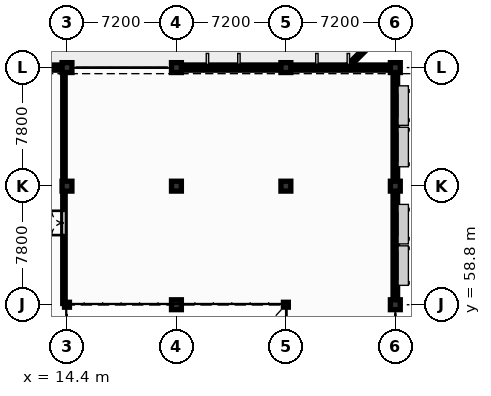
"""IFC4 building model, lengths in metres.
Left out: names, types, materials, properties, quantities, classifications, styles, units other than length and angle.
Written with IfcOpenShell. Run it as: python <this file> out.ifc"""

import sys

from ifc_helpers import new_model, si_unit, direction, frame, frame_2d, origin, origin_2d, place, context, subcontext, project, spatial, rectangle, hollow_circle, extrude, element, fill, save


model = new_model("IFC4")
c1 = context("Model", 3, precision=1e-05, world=origin(), true_north=direction((0.0, 1.0)))
c2 = subcontext(c1, "Body", "Model", "MODEL_VIEW")
j1 = project(units=[si_unit("LENGTHUNIT", "METRE"), si_unit("PLANEANGLEUNIT", "RADIAN")], contexts=[c1])
p1 = place(None, origin())
s1 = spatial("IfcSite", under=j1, at=p1, CompositionType="ELEMENT")
p2 = place(p1, origin())
s2 = spatial("IfcBuilding", under=s1, at=p2, CompositionType="ELEMENT")
p3 = place(p2, frame((0.0, 0.0, 5.1)))
s3 = spatial("IfcBuildingStorey", under=s2, at=p3, CompositionType="ELEMENT", Elevation=5.1)
p4 = place(p3, frame((14.4, 58.8, 0.0), z_axis=(0.0, 0.0, 1.0), x_axis=(1.0, 0.0, 0.0)))
e1 = element("IfcColumn", 1, at=p4, inside=s3, PredefinedType="COLUMN", context=c2, shape_type="SweptSolid", body=[
    extrude(hollow_circle(Radius=0.162, WallThickness=0.012, at=origin_2d()), origin(), (0.0, 0.0, 1.0), 3.84),
])
for number, where, z_axis, x_axis in (
    (2, (14.4, 66.6, 0.0), (0.0, 0.0, 1.0), (1.0, 0.0, 0.0)),
    (3, (14.4, 74.4, 0.0), (0.0, 0.0, 1.0), (1.0, 0.0, 0.0)),
    (4, (21.6, 58.8, 0.0), (0.0, 0.0, 1.0), (1.0, 0.0, 0.0)),
    (5, (21.6, 66.6, 0.0), (0.0, 0.0, 1.0), (1.0, 0.0, 0.0)),
    (6, (21.6, 74.4, 0.0), (0.0, 0.0, 1.0), (1.0, 0.0, 0.0)),
):
    element("IfcColumn", number, at=place(p3, frame(where, z_axis=z_axis, x_axis=x_axis)), inside=s3, PredefinedType="COLUMN", context=c2, shape_type="SweptSolid", body=[
        extrude(rectangle(XDim=0.65, YDim=0.65, at=origin_2d()), origin(), (0.0, 0.0, 1.0), 3.84),
    ])
p5 = place(p3, frame((28.8, 58.8, 0.0), z_axis=(0.0, 0.0, 1.0), x_axis=(1.0, 0.0, 0.0)))
e7 = element("IfcColumn", 7, at=p5, inside=s3, PredefinedType="COLUMN", context=c2, shape_type="SweptSolid", body=[
    extrude(hollow_circle(Radius=0.162, WallThickness=0.012, at=origin_2d()), origin(), (0.0, 0.0, 1.0), 3.84),
])
for number, where, z_axis, x_axis in (
    (8, (28.8, 66.6, 0.0), (0.0, 0.0, 1.0), (1.0, 0.0, 0.0)),
    (9, (28.8, 74.4, 0.0), (0.0, 0.0, 1.0), (1.0, 0.0, 0.0)),
    (10, (36.0, 58.8, 0.0), (0.0, 0.0, 1.0), (1.0, 0.0, 0.0)),
    (11, (36.0, 66.6, 0.0), (0.0, 0.0, 1.0), (1.0, 0.0, 0.0)),
    (12, (36.0, 74.4, 0.0), (0.0, 0.0, 1.0), (1.0, 0.0, 0.0)),
):
    element("IfcColumn", number, at=place(p3, frame(where, z_axis=z_axis, x_axis=x_axis)), inside=s3, PredefinedType="COLUMN", context=c2, shape_type="SweptSolid", body=[
        extrude(rectangle(XDim=0.65, YDim=0.65, at=origin_2d()), origin(), (0.0, 0.0, 1.0), 3.84),
    ])
p6 = place(p3, frame((36.0, 58.8, 0.0), z_axis=(0.0, 0.0, 1.0), x_axis=(0.0, 1.0, 0.0)))
e13 = element("IfcWall", 13, at=p6, inside=s3, PredefinedType="SOLIDWALL", context=c2, shape_type="SweptSolid", body=[
    extrude(rectangle(XDim=7.8, YDim=0.3, at=frame_2d((3.9, 0.0))), origin(), (0.0, 0.0, 1.0), 3.087),
])
p7 = place(p6, frame((1.6, 0.0, 0.85)))
e14 = element("IfcOpeningElement", 14, at=p7, cuts=e13, PredefinedType="OPENING", context=c2, shape_type="SweptSolid", body=[
    extrude(rectangle(XDim=1.95, YDim=2.1, at=frame_2d((0.975, 1.05))), frame((0.0, 0.16, 0.0), z_axis=(0.0, -1.0, 0.0), x_axis=(1.0, 0.0, 0.0)), (0.0, 0.0, 1.0), 0.32),
])
p8 = place(p6, frame((4.5, 0.0, 0.85)))
e15 = element("IfcOpeningElement", 15, at=p8, cuts=e13, PredefinedType="OPENING", context=c2, shape_type="SweptSolid", body=[
    extrude(rectangle(XDim=1.6, YDim=2.05, at=frame_2d((0.8, 1.025))), frame((0.0, 0.16, 0.0), z_axis=(0.0, -1.0, 0.0), x_axis=(1.0, 0.0, 0.0)), (0.0, 0.0, 1.0), 0.32),
])
p9 = place(p3, frame((36.0, 66.6, 0.0), z_axis=(0.0, 0.0, 1.0), x_axis=(0.0, 1.0, 0.0)))
e16 = element("IfcWall", 16, at=p9, inside=s3, PredefinedType="SOLIDWALL", context=c2, shape_type="SweptSolid", body=[
    extrude(rectangle(XDim=7.8, YDim=0.3, at=frame_2d((3.9, 0.0))), origin(), (0.0, 0.0, 1.0), 3.087),
])
p10 = place(p9, frame((1.6, 0.0, 0.85)))
e17 = element("IfcOpeningElement", 17, at=p10, cuts=e16, PredefinedType="OPENING", context=c2, shape_type="SweptSolid", body=[
    extrude(rectangle(XDim=1.95, YDim=2.1, at=frame_2d((0.975, 1.05))), frame((0.0, 0.16, 0.0), z_axis=(0.0, -1.0, 0.0), x_axis=(1.0, 0.0, 0.0)), (0.0, 0.0, 1.0), 0.32),
])
p11 = place(p9, frame((4.5, 0.0, 0.85)))
e18 = element("IfcOpeningElement", 18, at=p11, cuts=e16, PredefinedType="OPENING", context=c2, shape_type="SweptSolid", body=[
    extrude(rectangle(XDim=1.6, YDim=2.05, at=frame_2d((0.8, 1.025))), frame((0.0, 0.16, 0.0), z_axis=(0.0, -1.0, 0.0), x_axis=(1.0, 0.0, 0.0)), (0.0, 0.0, 1.0), 0.32),
])
p12 = place(p3, frame((7.2, 74.4, 0.0), z_axis=(0.0, 0.0, 1.0), x_axis=(1.0, 0.0, 0.0)))
e19 = element("IfcWall", 19, at=p12, inside=s3, PredefinedType="SOLIDWALL", context=c2, shape_type="SweptSolid", body=[
    extrude(rectangle(XDim=7.2, YDim=0.34, at=frame_2d((3.6, 0.0))), origin(), (0.0, 0.0, 1.0), 3.55),
])
p13 = place(p12, frame((4.4, 0.0, 0.898)))
e20 = element("IfcOpeningElement", 20, at=p13, cuts=e19, PredefinedType="OPENING", context=c2, shape_type="SweptSolid", body=[
    extrude(rectangle(XDim=1.75, YDim=2.15, at=frame_2d((0.875, 1.075))), frame((0.0, 0.18, 0.0), z_axis=(0.0, -1.0, 0.0), x_axis=(1.0, 0.0, 0.0)), (0.0, 0.0, 1.0), 0.36),
])
p14 = place(p3, frame((21.6, 74.4, 0.0), z_axis=(0.0, 0.0, 1.0), x_axis=(1.0, 0.0, 0.0)))
e21 = element("IfcWall", 21, at=p14, inside=s3, PredefinedType="SOLIDWALL", context=c2, shape_type="SweptSolid", body=[
    extrude(rectangle(XDim=7.2, YDim=0.34, at=frame_2d((3.6, 0.0))), origin(), (0.0, 0.0, 1.0), 3.55),
])
p15 = place(p14, frame((2.2, 0.0, 0.898)))
e22 = element("IfcOpeningElement", 22, at=p15, cuts=e21, PredefinedType="OPENING", context=c2, shape_type="SweptSolid", body=[
    extrude(rectangle(XDim=1.75, YDim=2.15, at=frame_2d((0.875, 1.075))), frame((0.0, 0.18, 0.0), z_axis=(0.0, -1.0, 0.0), x_axis=(1.0, 0.0, 0.0)), (0.0, 0.0, 1.0), 0.36),
])
p16 = place(p3, frame((28.8, 74.4, 0.0), z_axis=(0.0, 0.0, 1.0), x_axis=(1.0, 0.0, 0.0)))
e23 = element("IfcWall", 23, at=p16, inside=s3, PredefinedType="SOLIDWALL", context=c2, shape_type="SweptSolid", body=[
    extrude(rectangle(XDim=7.2, YDim=0.34, at=frame_2d((3.6, 0.0))), origin(), (0.0, 0.0, 1.0), 3.55),
])
p17 = place(p16, frame((2.2, 0.0, 0.898)))
e24 = element("IfcOpeningElement", 24, at=p17, cuts=e23, PredefinedType="OPENING", context=c2, shape_type="SweptSolid", body=[
    extrude(rectangle(XDim=1.75, YDim=2.15, at=frame_2d((0.875, 1.075))), frame((0.0, 0.18, 0.0), z_axis=(0.0, -1.0, 0.0), x_axis=(1.0, 0.0, 0.0)), (0.0, 0.0, 1.0), 0.36),
])
p18 = place(p3, frame((32.941, 74.542, 0.0), z_axis=(0.0, 0.0, 1.0), x_axis=(0.707136370339, 0.707077190795, 0.0)))
e25 = element("IfcWall", 25, at=p18, inside=s3, PredefinedType="PARAPET", context=c2, shape_type="SweptSolid", body=[
    extrude(rectangle(XDim=4.125, YDim=0.2, at=frame_2d((2.063, 0.0))), origin(), (0.0, 0.0, 1.0), 0.72),
])
p19 = place(p3, frame((14.2, 58.88, 0.0), z_axis=(0.0, 0.0, 1.0), x_axis=(0.0, 1.0, 0.0)))
e26 = element("IfcWall", 26, at=p19, inside=s3, PredefinedType="PARTITIONING", context=c2, shape_type="SweptSolid", body=[
    extrude(rectangle(XDim=15.52, YDim=0.16, at=frame_2d((7.76, 0.0))), origin(), (0.0, 0.0, 1.0), 2.943),
])
p20 = place(p19, frame((4.5, 0.0, 0.0)))
e27 = element("IfcOpeningElement", 27, at=p20, cuts=e26, PredefinedType="OPENING", context=c2, shape_type="SweptSolid", body=[
    extrude(rectangle(XDim=1.6, YDim=2.2, at=frame_2d((0.8, 1.1))), frame((0.0, 0.09, 0.0), z_axis=(0.0, -1.0, 0.0), x_axis=(1.0, 0.0, 0.0)), (0.0, 0.0, 1.0), 0.18),
])
p21 = place(p7, origin())
e28 = element("IfcWindow", 28, at=p21, inside=s3, PartitioningType="SINGLE_PANEL", PredefinedType="WINDOW", context=c2, shape_type="SweptSolid", body=[
    extrude(rectangle(XDim=1.95, YDim=2.1, at=frame_2d((0.975, 1.05))), frame((0.0, 0.03, 0.0), z_axis=(0.0, -1.0, 0.0), x_axis=(1.0, 0.0, 0.0)), (0.0, 0.0, 1.0), 0.06),
])
fill(e14, e28)
p22 = place(p8, origin())
e29 = element("IfcWindow", 29, at=p22, inside=s3, PartitioningType="SINGLE_PANEL", PredefinedType="WINDOW", context=c2, shape_type="SweptSolid", body=[
    extrude(rectangle(XDim=1.6, YDim=2.05, at=frame_2d((0.8, 1.025))), frame((0.0, 0.03, 0.0), z_axis=(0.0, -1.0, 0.0), x_axis=(1.0, 0.0, 0.0)), (0.0, 0.0, 1.0), 0.06),
])
fill(e15, e29)
p23 = place(p10, origin())
e30 = element("IfcWindow", 30, at=p23, inside=s3, PartitioningType="SINGLE_PANEL", PredefinedType="WINDOW", context=c2, shape_type="SweptSolid", body=[
    extrude(rectangle(XDim=1.95, YDim=2.1, at=frame_2d((0.975, 1.05))), frame((0.0, 0.03, 0.0), z_axis=(0.0, -1.0, 0.0), x_axis=(1.0, 0.0, 0.0)), (0.0, 0.0, 1.0), 0.06),
])
fill(e17, e30)
p24 = place(p11, origin())
e31 = element("IfcWindow", 31, at=p24, inside=s3, PartitioningType="SINGLE_PANEL", PredefinedType="WINDOW", context=c2, shape_type="SweptSolid", body=[
    extrude(rectangle(XDim=1.6, YDim=2.05, at=frame_2d((0.8, 1.025))), frame((0.0, 0.03, 0.0), z_axis=(0.0, -1.0, 0.0), x_axis=(1.0, 0.0, 0.0)), (0.0, 0.0, 1.0), 0.06),
])
fill(e18, e31)
p25 = place(p15, origin())
e32 = element("IfcWindow", 32, at=p25, inside=s3, PartitioningType="SINGLE_PANEL", PredefinedType="WINDOW", context=c2, shape_type="SweptSolid", body=[
    extrude(rectangle(XDim=1.75, YDim=2.15, at=frame_2d((0.875, 1.075))), frame((0.0, 0.03, 0.0), z_axis=(0.0, -1.0, 0.0), x_axis=(1.0, 0.0, 0.0)), (0.0, 0.0, 1.0), 0.06),
])
fill(e22, e32)
p26 = place(p17, origin())
e33 = element("IfcWindow", 33, at=p26, inside=s3, PartitioningType="SINGLE_PANEL", PredefinedType="WINDOW", context=c2, shape_type="SweptSolid", body=[
    extrude(rectangle(XDim=1.75, YDim=2.15, at=frame_2d((0.875, 1.075))), frame((0.0, 0.03, 0.0), z_axis=(0.0, -1.0, 0.0), x_axis=(1.0, 0.0, 0.0)), (0.0, 0.0, 1.0), 0.06),
])
fill(e24, e33)
p27 = place(p20, origin())
e34 = element("IfcDoor", 34, at=p27, inside=s3, OperationType="DOUBLE_DOOR_SINGLE_SWING", PredefinedType="DOOR", context=c2, shape_type="SweptSolid", body=[
    extrude(rectangle(XDim=1.6, YDim=2.2, at=frame_2d((0.8, 1.1))), frame((0.0, 0.025, 0.0), z_axis=(0.0, -1.0, 0.0), x_axis=(1.0, 0.0, 0.0)), (0.0, 0.0, 1.0), 0.05),
])
fill(e27, e34)
save(model, sys.argv[1])
